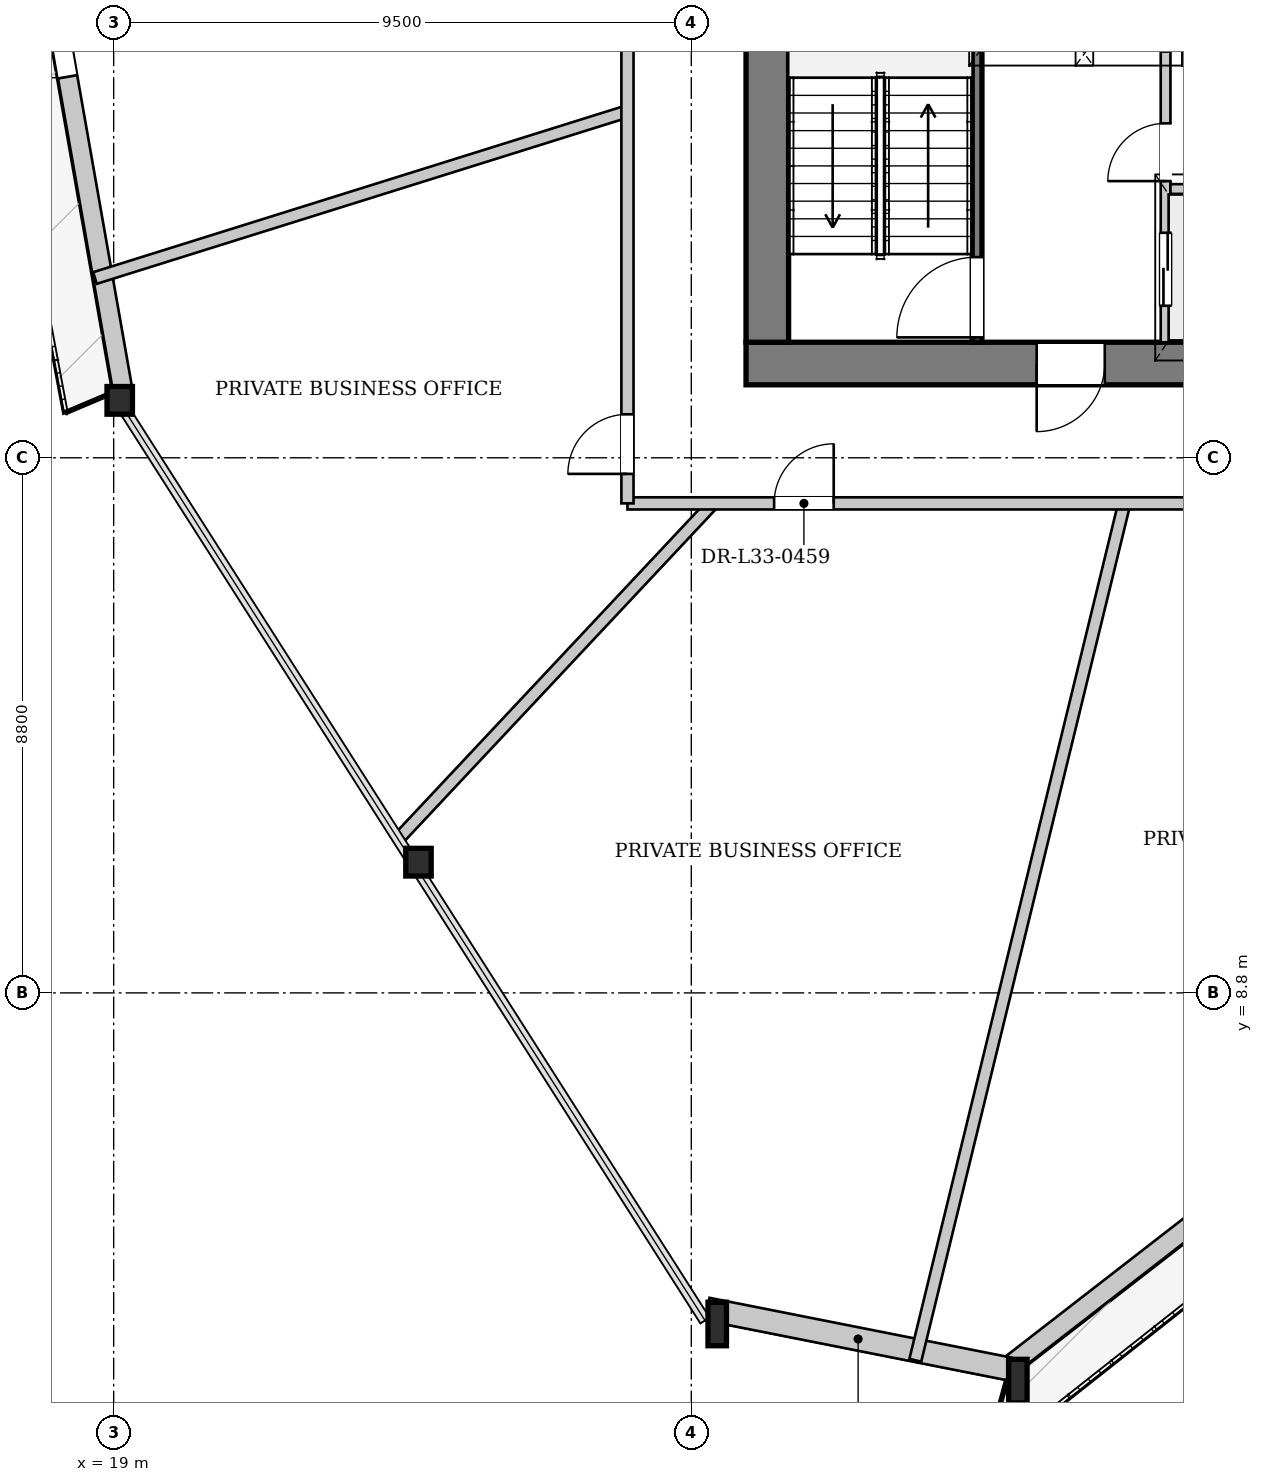
"""IFC4 building model, lengths in metres.
Left out: names, types, materials, properties, quantities, classifications, styles, units other than length and angle.
Written with IfcOpenShell. Run it as: python <this file> out.ifc"""

import sys

from ifc_helpers import new_model, si_unit, direction, frame, frame_2d, origin, origin_2d, place, context, subcontext, project, spatial, rectangle, i_section, extrude, source, transform, mapped, element, fill, save


model = new_model("IFC4")
c1 = context("Model", 3, precision=1e-05, world=origin(), true_north=direction((0.0, 1.0)))
c2 = subcontext(c1, "Body", "Model", "MODEL_VIEW")
j1 = project(units=[si_unit("LENGTHUNIT", "METRE"), si_unit("PLANEANGLEUNIT", "RADIAN")], contexts=[c1])
p1 = place(None, origin())
s1 = spatial("IfcSite", under=j1, at=p1, CompositionType="ELEMENT")
p2 = place(p1, origin())
s2 = spatial("IfcBuilding", under=s1, at=p2, CompositionType="ELEMENT")
p3 = place(p2, frame((0.0, 0.0, 127.0)))
s3 = spatial("IfcBuildingStorey", under=s2, at=p3, CompositionType="ELEMENT", Elevation=127.0)
m1 = source(origin(), c2, "Body", "SweptSolid", [
    extrude(i_section(OverallWidth=0.418, OverallDepth=0.455, WebThickness=0.038, FlangeThickness=0.059, at=origin_2d()), origin(), (0.0, 0.0, 1.0), 3.402),
])
p4 = place(p3, frame((18.993, 18.675, 0.0), z_axis=(0.06279761444, -0.07672074267, 0.995073056245), x_axis=(0.773828274732, 0.633395454061, 0.0)))
e1 = element("IfcColumn", 1, at=p4, inside=s3, PredefinedType="COLUMN", context=c2, shape_type="MappedRepresentation", body=[
    mapped(m1, transform((0.0, 0.0, 0.0), x_axis=(1.0, 0.0, 0.0), y_axis=(0.0, 1.0, 0.0), z_axis=(0.0, 0.0, 1.0), scale=1.0)),
])
m2 = source(origin(), c2, "Body", "SweptSolid", [
    extrude(i_section(OverallWidth=0.418, OverallDepth=0.455, WebThickness=0.038, FlangeThickness=0.059, at=origin_2d()), origin(), (0.0, 0.0, 1.0), 3.404),
])
p5 = place(p3, frame((23.859, 11.044, 0.0), z_axis=(0.090436033157, -0.055294354928, 0.994366058461), x_axis=(0.521641566686, 0.853164741363, 0.0)))
e2 = element("IfcColumn", 2, at=p5, inside=s3, PredefinedType="COLUMN", context=c2, shape_type="MappedRepresentation", body=[
    mapped(m2, transform((0.0, 0.0, 0.0), x_axis=(1.0, 0.0, 0.0), y_axis=(0.0, 1.0, 0.0), z_axis=(0.0, 0.0, 1.0), scale=1.0)),
])
m3 = source(origin(), c2, "Body", "SweptSolid", [
    extrude(i_section(OverallWidth=0.304, OverallDepth=0.716, WebThickness=0.021, FlangeThickness=0.04, at=origin_2d()), origin(), (0.0, 0.0, 1.0), 3.411),
])
p6 = place(p3, frame((28.725, 3.413, 0.0), z_axis=(0.117749905204, -0.033929152016, 0.992463486718), x_axis=(0.276880636988, 0.960904320347, 0.0)))
e3 = element("IfcColumn", 3, at=p6, inside=s3, PredefinedType="COLUMN", context=c2, shape_type="MappedRepresentation", body=[
    mapped(m3, transform((0.0, 0.0, 0.0), x_axis=(1.0, 0.0, 0.0), y_axis=(0.0, 1.0, 0.0), z_axis=(0.0, 0.0, 1.0), scale=1.0)),
])
m4 = source(origin(), c2, "Body", "SweptSolid", [
    extrude(i_section(OverallWidth=0.304, OverallDepth=0.716, WebThickness=0.021, FlangeThickness=0.04, at=origin_2d()), origin(), (0.0, 0.0, 1.0), 3.405),
])
p7 = place(p3, frame((33.687, 2.43, 0.0), z_axis=(0.107554746128, -0.008317567034, 0.994164370043), x_axis=(0.077103121545, 0.997023123427, 0.0)))
e4 = element("IfcColumn", 4, at=p7, inside=s3, PredefinedType="COLUMN", context=c2, shape_type="MappedRepresentation", body=[
    mapped(m4, transform((0.0, 0.0, 0.0), x_axis=(1.0, 0.0, 0.0), y_axis=(0.0, 1.0, 0.0), z_axis=(0.0, 0.0, 1.0), scale=1.0)),
])
p8 = place(p3, frame((52.388, 17.136, 0.0), z_axis=(0.0, 0.0, 1.0), x_axis=(-0.790214020135, -0.612830973746, 0.0)))
e5 = element("IfcWall", 5, at=p8, inside=s3, PredefinedType="SOLIDWALL", context=c2, shape_type="SweptSolid", body=[
    extrude(rectangle(XDim=23.79, YDim=0.32, at=frame_2d((11.895, 0.0))), origin(), (0.0, 0.0, 1.0), 2.692),
])
p9 = place(p8, frame((7.063, 0.0, 0.0)))
e6 = element("IfcOpeningElement", 6, at=p9, cuts=e5, PredefinedType="OPENING", context=c2, shape_type="SweptSolid", body=[
    extrude(rectangle(XDim=1.1, YDim=2.3, at=frame_2d((0.55, 1.15))), frame((0.0, 0.17, 0.0), z_axis=(0.0, -1.0, 0.0), x_axis=(1.0, 0.0, 0.0)), (0.0, 0.0, 1.0), 0.34),
])
p10 = place(p8, frame((16.705, 0.0, 0.372)))
e7 = element("IfcOpeningElement", 7, at=p10, cuts=e5, PredefinedType="OPENING", context=c2, shape_type="SweptSolid", body=[
    extrude(rectangle(XDim=1.8, YDim=2.2, at=frame_2d((0.9, 1.1))), frame((0.0, 0.17, 0.0), z_axis=(0.0, -1.0, 0.0), x_axis=(1.0, 0.0, 0.0)), (0.0, 0.0, 1.0), 0.34),
])
p11 = place(p3, frame((33.724, 2.617, 0.0), z_axis=(0.0, 0.0, 1.0), x_axis=(-0.980957549711, 0.194222258416, 0.0)))
e8 = element("IfcWall", 8, at=p11, inside=s3, PredefinedType="SOLIDWALL", context=c2, shape_type="SweptSolid", body=[
    extrude(rectangle(XDim=5.058, YDim=0.38, at=frame_2d((2.529, 0.0))), origin(), (0.0, 0.0, 1.0), 2.692),
])
p12 = place(p3, frame((19.15, 18.702, 0.0), z_axis=(0.0, 0.0, 1.0), x_axis=(-0.173250549445, 0.984877782832, 0.0)))
e9 = element("IfcWall", 9, at=p12, inside=s3, PredefinedType="SOLIDWALL", context=c2, shape_type="SweptSolid", body=[
    extrude(rectangle(XDim=18.101, YDim=0.32, at=frame_2d((9.05, 0.0))), origin(), (0.0, 0.0, 1.0), 2.692),
])
p13 = place(p12, frame((5.242, 0.0, 0.0)))
e10 = element("IfcOpeningElement", 10, at=p13, cuts=e9, PredefinedType="OPENING", context=c2, shape_type="SweptSolid", body=[
    extrude(rectangle(XDim=1.1, YDim=2.3, at=frame_2d((0.55, 1.15))), frame((0.0, 0.17, 0.0), z_axis=(0.0, -1.0, 0.0), x_axis=(1.0, 0.0, 0.0)), (0.0, 0.0, 1.0), 0.34),
])
p14 = place(p12, frame((13.245, 0.0, 0.372)))
e11 = element("IfcOpeningElement", 11, at=p14, cuts=e9, PredefinedType="OPENING", context=c2, shape_type="SweptSolid", body=[
    extrude(rectangle(XDim=1.8, YDim=2.2, at=frame_2d((0.9, 1.1))), frame((0.0, 0.17, 0.0), z_axis=(0.0, -1.0, 0.0), x_axis=(1.0, 0.0, 0.0)), (0.0, 0.0, 1.0), 0.34),
])
p15 = place(p3, frame((46.6, 19.15, 0.0), z_axis=(0.0, 0.0, 1.0), x_axis=(-1.0, 0.0, 0.0)))
e12 = element("IfcWall", 12, at=p15, inside=s3, PredefinedType="SHEAR", context=c2, shape_type="SweptSolid", body=[
    extrude(rectangle(XDim=17.2, YDim=0.7, at=frame_2d((8.6, 0.0))), origin(), (0.0, 0.0, 1.0), 3.3),
])
p16 = place(p15, frame((4.8, 0.0, 0.0)))
e13 = element("IfcOpeningElement", 13, at=p16, cuts=e12, PredefinedType="OPENING", context=c2, shape_type="SweptSolid", body=[
    extrude(rectangle(XDim=1.12, YDim=2.25, at=frame_2d((0.56, 1.125))), frame((0.0, 0.36, 0.0), z_axis=(0.0, -1.0, 0.0), x_axis=(1.0, 0.0, 0.0)), (0.0, 0.0, 1.0), 0.72),
])
p17 = place(p15, frame((11.3, 0.0, 0.0)))
e14 = element("IfcOpeningElement", 14, at=p17, cuts=e12, PredefinedType="OPENING", context=c2, shape_type="SweptSolid", body=[
    extrude(rectangle(XDim=1.12, YDim=2.25, at=frame_2d((0.56, 1.125))), frame((0.0, 0.36, 0.0), z_axis=(0.0, -1.0, 0.0), x_axis=(1.0, 0.0, 0.0)), (0.0, 0.0, 1.0), 0.72),
])
p18 = place(p3, frame((29.75, 19.5, 0.0), z_axis=(0.0, 0.0, 1.0), x_axis=(0.0, 1.0, 0.0)))
e15 = element("IfcWall", 15, at=p18, inside=s3, PredefinedType="SHEAR", context=c2, shape_type="SweptSolid", body=[
    extrude(rectangle(XDim=14.2, YDim=0.7, at=frame_2d((7.1, 0.0))), origin(), (0.0, 0.0, 1.0), 3.3),
])
p19 = place(p18, frame((7.42, 0.0, 0.0)))
e16 = element("IfcOpeningElement", 16, at=p19, cuts=e15, PredefinedType="OPENING", context=c2, shape_type="SweptSolid", body=[
    extrude(rectangle(XDim=1.6, YDim=2.2, at=frame_2d((0.8, 1.1))), frame((0.0, 0.36, 0.0), z_axis=(0.0, -1.0, 0.0), x_axis=(1.0, 0.0, 0.0)), (0.0, 0.0, 1.0), 0.72),
])
p20 = place(p3, frame((33.2, 19.5, 0.0), z_axis=(0.0, 0.0, 1.0), x_axis=(0.0, 1.0, 0.0)))
e17 = element("IfcWall", 17, at=p20, inside=s3, PredefinedType="PARTITIONING", context=c2, shape_type="SweptSolid", body=[
    extrude(rectangle(XDim=7.46, YDim=0.16, at=frame_2d((3.73, 0.0))), origin(), (0.0, 0.0, 1.0), 3.3),
])
p21 = place(p20, frame((0.08, 0.0, 0.0)))
e18 = element("IfcOpeningElement", 18, at=p21, cuts=e17, PredefinedType="OPENING", context=c2, shape_type="SweptSolid", body=[
    extrude(rectangle(XDim=1.32, YDim=2.2, at=frame_2d((0.66, 1.1))), frame((0.0, 0.09, 0.0), z_axis=(0.0, -1.0, 0.0), x_axis=(1.0, 0.0, 0.0)), (0.0, 0.0, 1.0), 0.18),
])
p22 = place(p3, frame((36.3, 19.5, 0.0), z_axis=(0.0, 0.0, 1.0), x_axis=(0.0, 1.0, 0.0)))
e19 = element("IfcWall", 19, at=p22, inside=s3, PredefinedType="PARTITIONING", context=c2, shape_type="SweptSolid", body=[
    extrude(rectangle(XDim=4.78, YDim=0.16, at=frame_2d((2.39, 0.0))), origin(), (0.0, 0.0, 1.0), 3.3),
])
p23 = place(p22, frame((0.6, 0.0, 0.0)))
e20 = element("IfcOpeningElement", 20, at=p23, cuts=e19, PredefinedType="OPENING", context=c2, shape_type="SweptSolid", body=[
    extrude(rectangle(XDim=1.2, YDim=2.2, at=frame_2d((0.6, 1.1))), frame((0.0, 0.09, 0.0), z_axis=(0.0, -1.0, 0.0), x_axis=(1.0, 0.0, 0.0)), (0.0, 0.0, 1.0), 0.18),
])
p24 = place(p22, frame((2.65, 0.0, 0.0)))
e21 = element("IfcOpeningElement", 21, at=p24, cuts=e19, PredefinedType="OPENING", context=c2, shape_type="SweptSolid", body=[
    extrude(rectangle(XDim=0.95, YDim=2.1, at=frame_2d((0.475, 1.05))), frame((0.0, 0.09, 0.0), z_axis=(0.0, -1.0, 0.0), x_axis=(1.0, 0.0, 0.0)), (0.0, 0.0, 1.0), 0.18),
])
p25 = place(p3, frame((36.38, 22.02, 0.0), z_axis=(0.0, 0.0, 1.0), x_axis=(1.0, 0.0, 0.0)))
e22 = element("IfcWall", 22, at=p25, inside=s3, PredefinedType="PARTITIONING", context=c2, shape_type="SweptSolid", body=[
    extrude(rectangle(XDim=3.24, YDim=0.16, at=frame_2d((1.62, 0.0))), origin(), (0.0, 0.0, 1.0), 3.3),
])
p26 = place(p3, frame((27.45, 23.298, 0.0), z_axis=(0.0, 0.0, 1.0), x_axis=(-0.954328374734, -0.298759691354, 0.0)))
e23 = element("IfcWall", 23, at=p26, inside=s3, PredefinedType="PARTITIONING", context=c2, shape_type="SweptSolid", body=[
    extrude(rectangle(XDim=9.177, YDim=0.2, at=frame_2d((4.588, 0.0))), origin(), (0.0, 0.0, 1.0), 3.3),
])
p27 = place(p3, frame((28.856, 16.85, 0.0), z_axis=(0.0, 0.0, 1.0), x_axis=(-0.684090850855, -0.729396810917, 0.0)))
e24 = element("IfcWall", 24, at=p27, inside=s3, PredefinedType="PARTITIONING", context=c2, shape_type="SweptSolid", body=[
    extrude(rectangle(XDim=7.539, YDim=0.2, at=frame_2d((3.77, 0.0))), origin(), (0.0, 0.0, 1.0), 3.3),
])
p28 = place(p3, frame((35.622, 16.85, 0.0), z_axis=(0.0, 0.0, 1.0), x_axis=(-0.236994928631, -0.971510887125, 0.0)))
e25 = element("IfcWall", 25, at=p28, inside=s3, PredefinedType="PARTITIONING", context=c2, shape_type="SweptSolid", body=[
    extrude(rectangle(XDim=14.505, YDim=0.2, at=frame_2d((7.252, 0.0))), origin(), (0.0, 0.0, 1.0), 3.3),
])
p29 = place(p3, frame((27.45, 16.85, 0.0), z_axis=(0.0, 0.0, 1.0), x_axis=(1.0, 0.0, 0.0)))
e26 = element("IfcWall", 26, at=p29, inside=s3, PredefinedType="PARTITIONING", context=c2, shape_type="SweptSolid", body=[
    extrude(rectangle(XDim=21.1, YDim=0.2, at=frame_2d((10.55, 0.0))), origin(), (0.0, 0.0, 1.0), 3.3),
])
p30 = place(p29, frame((2.412, 0.0, 0.0)))
e27 = element("IfcOpeningElement", 27, at=p30, cuts=e26, PredefinedType="OPENING", context=c2, shape_type="SweptSolid", body=[
    extrude(rectangle(XDim=0.98, YDim=2.15, at=frame_2d((0.49, 1.075))), frame((0.0, 0.11, 0.0), z_axis=(0.0, -1.0, 0.0), x_axis=(1.0, 0.0, 0.0)), (0.0, 0.0, 1.0), 0.22),
])
p31 = place(p29, frame((9.269, 0.0, 0.0)))
e28 = element("IfcOpeningElement", 28, at=p31, cuts=e26, PredefinedType="OPENING", context=c2, shape_type="SweptSolid", body=[
    extrude(rectangle(XDim=0.98, YDim=2.15, at=frame_2d((0.49, 1.075))), frame((0.0, 0.11, 0.0), z_axis=(0.0, -1.0, 0.0), x_axis=(1.0, 0.0, 0.0)), (0.0, 0.0, 1.0), 0.22),
])
p32 = place(p29, frame((16.109, 0.0, 0.0)))
e29 = element("IfcOpeningElement", 29, at=p32, cuts=e26, PredefinedType="OPENING", context=c2, shape_type="SweptSolid", body=[
    extrude(rectangle(XDim=0.98, YDim=2.15, at=frame_2d((0.49, 1.075))), frame((0.0, 0.11, 0.0), z_axis=(0.0, -1.0, 0.0), x_axis=(1.0, 0.0, 0.0)), (0.0, 0.0, 1.0), 0.22),
])
p33 = place(p3, frame((27.45, 16.85, 0.0), z_axis=(0.0, 0.0, 1.0), x_axis=(0.0, 1.0, 0.0)))
e30 = element("IfcWall", 30, at=p33, inside=s3, PredefinedType="PARTITIONING", context=c2, shape_type="SweptSolid", body=[
    extrude(rectangle(XDim=19.5, YDim=0.2, at=frame_2d((9.75, 0.0))), origin(), (0.0, 0.0, 1.0), 3.3),
])
p34 = place(p33, frame((16.204, 0.0, 0.0)))
e31 = element("IfcOpeningElement", 31, at=p34, cuts=e30, PredefinedType="OPENING", context=c2, shape_type="SweptSolid", body=[
    extrude(rectangle(XDim=0.98, YDim=2.15, at=frame_2d((0.49, 1.075))), frame((0.0, 0.11, 0.0), z_axis=(0.0, -1.0, 0.0), x_axis=(1.0, 0.0, 0.0)), (0.0, 0.0, 1.0), 0.22),
])
p35 = place(p33, frame((8.732, 0.0, 0.0)))
e32 = element("IfcOpeningElement", 32, at=p35, cuts=e30, PredefinedType="OPENING", context=c2, shape_type="SweptSolid", body=[
    extrude(rectangle(XDim=0.98, YDim=2.15, at=frame_2d((0.49, 1.075))), frame((0.0, 0.11, 0.0), z_axis=(0.0, -1.0, 0.0), x_axis=(1.0, 0.0, 0.0)), (0.0, 0.0, 1.0), 0.22),
])
p36 = place(p33, frame((0.485, 0.0, 0.0)))
e33 = element("IfcOpeningElement", 33, at=p36, cuts=e30, PredefinedType="OPENING", context=c2, shape_type="SweptSolid", body=[
    extrude(rectangle(XDim=0.98, YDim=2.15, at=frame_2d((0.49, 1.075))), frame((0.0, 0.11, 0.0), z_axis=(0.0, -1.0, 0.0), x_axis=(1.0, 0.0, 0.0)), (0.0, 0.0, 1.0), 0.22),
])
m5 = source(origin(), c2, "Body", "SweptSolid", [
    extrude(rectangle(XDim=1.1, YDim=2.3, at=frame_2d((0.55, 1.15))), frame((0.0, 0.025, 0.0), z_axis=(0.0, -1.0, 0.0), x_axis=(1.0, 0.0, 0.0)), (0.0, 0.0, 1.0), 0.05),
])
p37 = place(p13, origin())
e34 = element("IfcDoor", 34, at=p37, inside=s3, OperationType="SINGLE_SWING_RIGHT", PredefinedType="DOOR", context=c2, shape_type="MappedRepresentation", body=[
    mapped(m5, transform((0.0, 0.0, 0.0), x_axis=(1.0, 0.0, 0.0), y_axis=(0.0, 1.0, 0.0), z_axis=(0.0, 0.0, 1.0), scale=1.0)),
])
fill(e10, e34)
m6 = source(origin(), c2, "Body", "SweptSolid", [
    extrude(rectangle(XDim=1.12, YDim=2.25, at=frame_2d((0.56, 1.125))), frame((0.0, 0.025, 0.0), z_axis=(0.0, -1.0, 0.0), x_axis=(1.0, 0.0, 0.0)), (0.0, 0.0, 1.0), 0.05),
])
p38 = place(p17, origin())
e35 = element("IfcDoor", 35, at=p38, inside=s3, OperationType="SINGLE_SWING_RIGHT", PredefinedType="DOOR", context=c2, shape_type="MappedRepresentation", body=[
    mapped(m6, transform((0.0, 0.0, 0.0), x_axis=(1.0, 0.0, 0.0), y_axis=(0.0, 1.0, 0.0), z_axis=(0.0, 0.0, 1.0), scale=1.0)),
])
fill(e14, e35)
m7 = source(origin(), c2, "Body", "SweptSolid", [
    extrude(rectangle(XDim=1.32, YDim=2.2, at=frame_2d((0.66, 1.1))), frame((0.0, 0.025, 0.0), z_axis=(0.0, -1.0, 0.0), x_axis=(1.0, 0.0, 0.0)), (0.0, 0.0, 1.0), 0.05),
])
p39 = place(p21, origin())
e36 = element("IfcDoor", 36, at=p39, inside=s3, OperationType="SINGLE_SWING_LEFT", PredefinedType="DOOR", context=c2, shape_type="MappedRepresentation", body=[
    mapped(m7, transform((0.0, 0.0, 0.0), x_axis=(1.0, 0.0, 0.0), y_axis=(0.0, 1.0, 0.0), z_axis=(0.0, 0.0, 1.0), scale=1.0)),
])
fill(e18, e36)
m8 = source(origin(), c2, "Body", "SweptSolid", [
    extrude(rectangle(XDim=1.2, YDim=2.2, at=frame_2d((0.6, 1.1))), frame((0.0, 0.025, 0.0), z_axis=(0.0, -1.0, 0.0), x_axis=(1.0, 0.0, 0.0)), (0.0, 0.0, 1.0), 0.05),
])
p40 = place(p23, origin())
e37 = element("IfcDoor", 37, at=p40, inside=s3, OperationType="DOUBLE_DOOR_SLIDING", PredefinedType="DOOR", context=c2, shape_type="MappedRepresentation", body=[
    mapped(m8, transform((0.0, 0.0, 0.0), x_axis=(1.0, 0.0, 0.0), y_axis=(0.0, 1.0, 0.0), z_axis=(0.0, 0.0, 1.0), scale=1.0)),
])
fill(e20, e37)
m9 = source(origin(), c2, "Body", "SweptSolid", [
    extrude(rectangle(XDim=0.95, YDim=2.1, at=frame_2d((0.475, 1.05))), frame((0.0, 0.025, 0.0), z_axis=(0.0, -1.0, 0.0), x_axis=(1.0, 0.0, 0.0)), (0.0, 0.0, 1.0), 0.05),
])
p41 = place(p24, origin())
e38 = element("IfcDoor", 38, at=p41, inside=s3, OperationType="SINGLE_SWING_LEFT", PredefinedType="DOOR", context=c2, shape_type="MappedRepresentation", body=[
    mapped(m9, transform((0.0, 0.0, 0.0), x_axis=(1.0, 0.0, 0.0), y_axis=(0.0, 1.0, 0.0), z_axis=(0.0, 0.0, 1.0), scale=1.0)),
])
fill(e21, e38)
m10 = source(origin(), c2, "Body", "SweptSolid", [
    extrude(rectangle(XDim=0.98, YDim=2.15, at=frame_2d((0.49, 1.075))), frame((0.0, 0.025, 0.0), z_axis=(0.0, -1.0, 0.0), x_axis=(1.0, 0.0, 0.0)), (0.0, 0.0, 1.0), 0.05),
])
p42 = place(p30, origin())
e39 = element("IfcDoor", 39, at=p42, inside=s3, OperationType="SINGLE_SWING_RIGHT", PredefinedType="DOOR", context=c2, shape_type="MappedRepresentation", body=[
    mapped(m10, transform((0.0, 0.0, 0.0), x_axis=(1.0, 0.0, 0.0), y_axis=(0.0, 1.0, 0.0), z_axis=(0.0, 0.0, 1.0), scale=1.0)),
])
fill(e27, e39)
p43 = place(p36, origin())
e40 = element("IfcDoor", 40, at=p43, inside=s3, OperationType="SINGLE_SWING_LEFT", PredefinedType="DOOR", context=c2, shape_type="MappedRepresentation", body=[
    mapped(m10, transform((0.0, 0.0, 0.0), x_axis=(1.0, 0.0, 0.0), y_axis=(0.0, 1.0, 0.0), z_axis=(0.0, 0.0, 1.0), scale=1.0)),
])
fill(e33, e40)
save(model, sys.argv[1])
